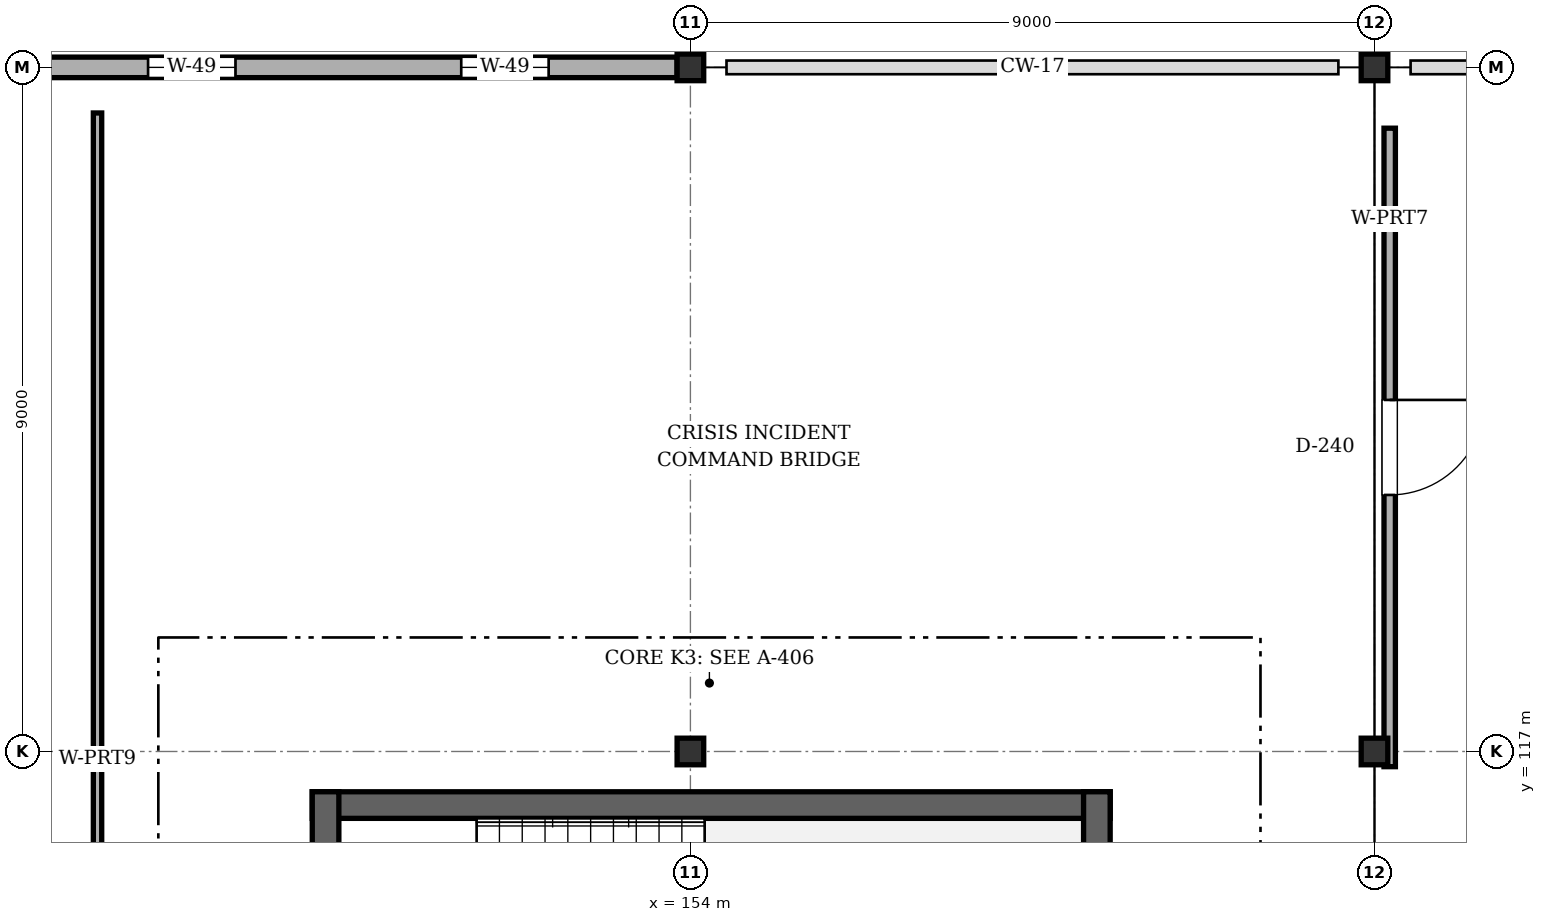
"""IFC4 building model, lengths in metres.
Left out: names, types, materials, properties, quantities, classifications, styles, units other than length and angle.
Written with IfcOpenShell. Run it as: python <this file> out.ifc"""

import sys

from ifc_helpers import new_model, si_unit, direction, frame, frame_2d, origin, origin_2d, place, context, subcontext, project, spatial, rectangle, i_section, extrude, element, fill, save


model = new_model("IFC4")
c1 = context("Model", 3, precision=1e-05, world=origin(), true_north=direction((0.0, 1.0)))
c2 = subcontext(c1, "Body", "Model", "MODEL_VIEW")
j1 = project(units=[si_unit("LENGTHUNIT", "METRE"), si_unit("PLANEANGLEUNIT", "RADIAN")], contexts=[c1])
p1 = place(None, origin())
s1 = spatial("IfcSite", under=j1, at=p1, CompositionType="ELEMENT")
p2 = place(p1, origin())
s2 = spatial("IfcBuilding", under=s1, at=p2, CompositionType="ELEMENT")
p3 = place(p2, frame((0.0, 0.0, 17.6)))
s3 = spatial("IfcBuildingStorey", under=s2, at=p3, CompositionType="ELEMENT", Elevation=17.6)
for number, where, z_axis, x_axis in (
    (1, (154.0, 117.0, 0.0), (0.0, 0.0, 1.0), (1.0, 0.0, 0.0)),
    (2, (154.0, 126.0, 0.0), (0.0, 0.0, 1.0), (1.0, 0.0, 0.0)),
    (3, (163.0, 117.0, 0.0), (0.0, 0.0, 1.0), (1.0, 0.0, 0.0)),
    (4, (163.0, 126.0, 0.0), (0.0, 0.0, 1.0), (1.0, 0.0, 0.0)),
):
    element("IfcColumn", number, at=place(p3, frame(where, z_axis=z_axis, x_axis=x_axis)), inside=s3, PredefinedType="COLUMN", context=c2, shape_type="SweptSolid", body=[
        extrude(i_section(OverallWidth=0.35, OverallDepth=0.35, WebThickness=0.012, FlangeThickness=0.019, FilletRadius=0.02, at=origin_2d()), origin(), (0.0, 0.0, 1.0), 3.2),
    ])
p4 = place(p3, frame((145.175, 126.0, 0.0), z_axis=(0.0, 0.0, 1.0), x_axis=(1.0, 0.0, 0.0)))
e5 = element("IfcWall", 5, at=p4, inside=s3, PredefinedType="SOLIDWALL", context=c2, shape_type="SweptSolid", body=[
    extrude(rectangle(XDim=8.65, YDim=0.27, at=frame_2d((4.325, 0.0))), origin(), (0.0, 0.0, 1.0), 2.535),
])
p5 = place(p4, frame((1.69, 0.0, 0.9)))
e6 = element("IfcOpeningElement", 6, at=p5, cuts=e5, PredefinedType="OPENING", context=c2, shape_type="SweptSolid", body=[
    extrude(rectangle(XDim=1.15, YDim=1.45, at=frame_2d((0.575, 0.725))), frame((0.0, 0.145, 0.0), z_axis=(0.0, -1.0, 0.0), x_axis=(1.0, 0.0, 0.0)), (0.0, 0.0, 1.0), 0.29),
])
p6 = place(p4, frame((5.81, 0.0, 0.9)))
e7 = element("IfcOpeningElement", 7, at=p6, cuts=e5, PredefinedType="OPENING", context=c2, shape_type="SweptSolid", body=[
    extrude(rectangle(XDim=1.15, YDim=1.45, at=frame_2d((0.575, 0.725))), frame((0.0, 0.145, 0.0), z_axis=(0.0, -1.0, 0.0), x_axis=(1.0, 0.0, 0.0)), (0.0, 0.0, 1.0), 0.29),
])
p7 = place(p3, frame((159.522, 116.295, 0.0), z_axis=(0.0, 0.0, 1.0), x_axis=(-1.0, 0.0, 0.0)))
e8 = element("IfcWall", 8, at=p7, inside=s3, PredefinedType="SHEAR", context=c2, shape_type="SweptSolid", body=[
    extrude(rectangle(XDim=10.498, YDim=0.35, at=frame_2d((5.249, 0.0))), origin(), (0.0, 0.0, 1.0), 3.02),
])
for number, where, z_axis, x_axis in (
    (9, (159.347, 112.15, 0.0), (0.0, 0.0, 1.0), (0.0, 1.0, 0.0)),
    (10, (149.2, 116.47, 0.0), (0.0, 0.0, 1.0), (0.0, -1.0, 0.0)),
):
    element("IfcWall", number, at=place(p3, frame(where, z_axis=z_axis, x_axis=x_axis)), inside=s3, PredefinedType="SHEAR", context=c2, shape_type="SweptSolid", body=[
        extrude(rectangle(XDim=4.32, YDim=0.35, at=frame_2d((2.16, 0.0))), origin(), (0.0, 0.0, 1.0), 3.02),
    ])
p8 = place(p3, frame((146.2, 125.4, 0.0), z_axis=(0.0, 0.0, 1.0), x_axis=(0.0, -1.0, 0.0)))
e11 = element("IfcWall", 11, at=p8, inside=s3, PredefinedType="PARTITIONING", context=c2, shape_type="SweptSolid", body=[
    extrude(rectangle(XDim=17.0, YDim=0.11, at=frame_2d((8.5, 0.0))), origin(), (0.0, 0.0, 1.0), 2.535),
])
p9 = place(p3, frame((163.2, 125.2, 0.0), z_axis=(0.0, 0.0, 1.0), x_axis=(0.0, -1.0, 0.0)))
e12 = element("IfcWall", 12, at=p9, inside=s3, PredefinedType="PARTITIONING", context=c2, shape_type="SweptSolid", body=[
    extrude(rectangle(XDim=8.4, YDim=0.15, at=frame_2d((4.2, 0.0))), origin(), (0.0, 0.0, 1.0), 2.355),
])
p10 = place(p9, frame((3.575, 0.0, 0.0)))
e13 = element("IfcOpeningElement", 13, at=p10, cuts=e12, PredefinedType="OPENING", context=c2, shape_type="SweptSolid", body=[
    extrude(rectangle(XDim=1.25, YDim=2.1, at=frame_2d((0.625, 1.05))), frame((0.0, 0.085, 0.0), z_axis=(0.0, -1.0, 0.0), x_axis=(1.0, 0.0, 0.0)), (0.0, 0.0, 1.0), 0.17),
])
p11 = place(p5, origin())
e14 = element("IfcWindow", 14, at=p11, inside=s3, PartitioningType="SINGLE_PANEL", PredefinedType="WINDOW", context=c2, shape_type="SweptSolid", body=[
    extrude(rectangle(XDim=1.15, YDim=1.45, at=frame_2d((0.575, 0.725))), frame((0.0, 0.03, 0.0), z_axis=(0.0, -1.0, 0.0), x_axis=(1.0, 0.0, 0.0)), (0.0, 0.0, 1.0), 0.06),
])
fill(e6, e14)
p12 = place(p6, origin())
e15 = element("IfcWindow", 15, at=p12, inside=s3, PartitioningType="SINGLE_PANEL", PredefinedType="WINDOW", context=c2, shape_type="SweptSolid", body=[
    extrude(rectangle(XDim=1.15, YDim=1.45, at=frame_2d((0.575, 0.725))), frame((0.0, 0.03, 0.0), z_axis=(0.0, -1.0, 0.0), x_axis=(1.0, 0.0, 0.0)), (0.0, 0.0, 1.0), 0.06),
])
fill(e7, e15)
p13 = place(p10, origin())
e16 = element("IfcDoor", 16, at=p13, inside=s3, OperationType="SINGLE_SWING_LEFT", PredefinedType="DOOR", context=c2, shape_type="SweptSolid", body=[
    extrude(rectangle(XDim=1.25, YDim=2.1, at=frame_2d((0.625, 1.05))), frame((0.0, 0.025, 0.0), z_axis=(0.0, -1.0, 0.0), x_axis=(1.0, 0.0, 0.0)), (0.0, 0.0, 1.0), 0.05),
])
fill(e13, e16)
save(model, sys.argv[1])
